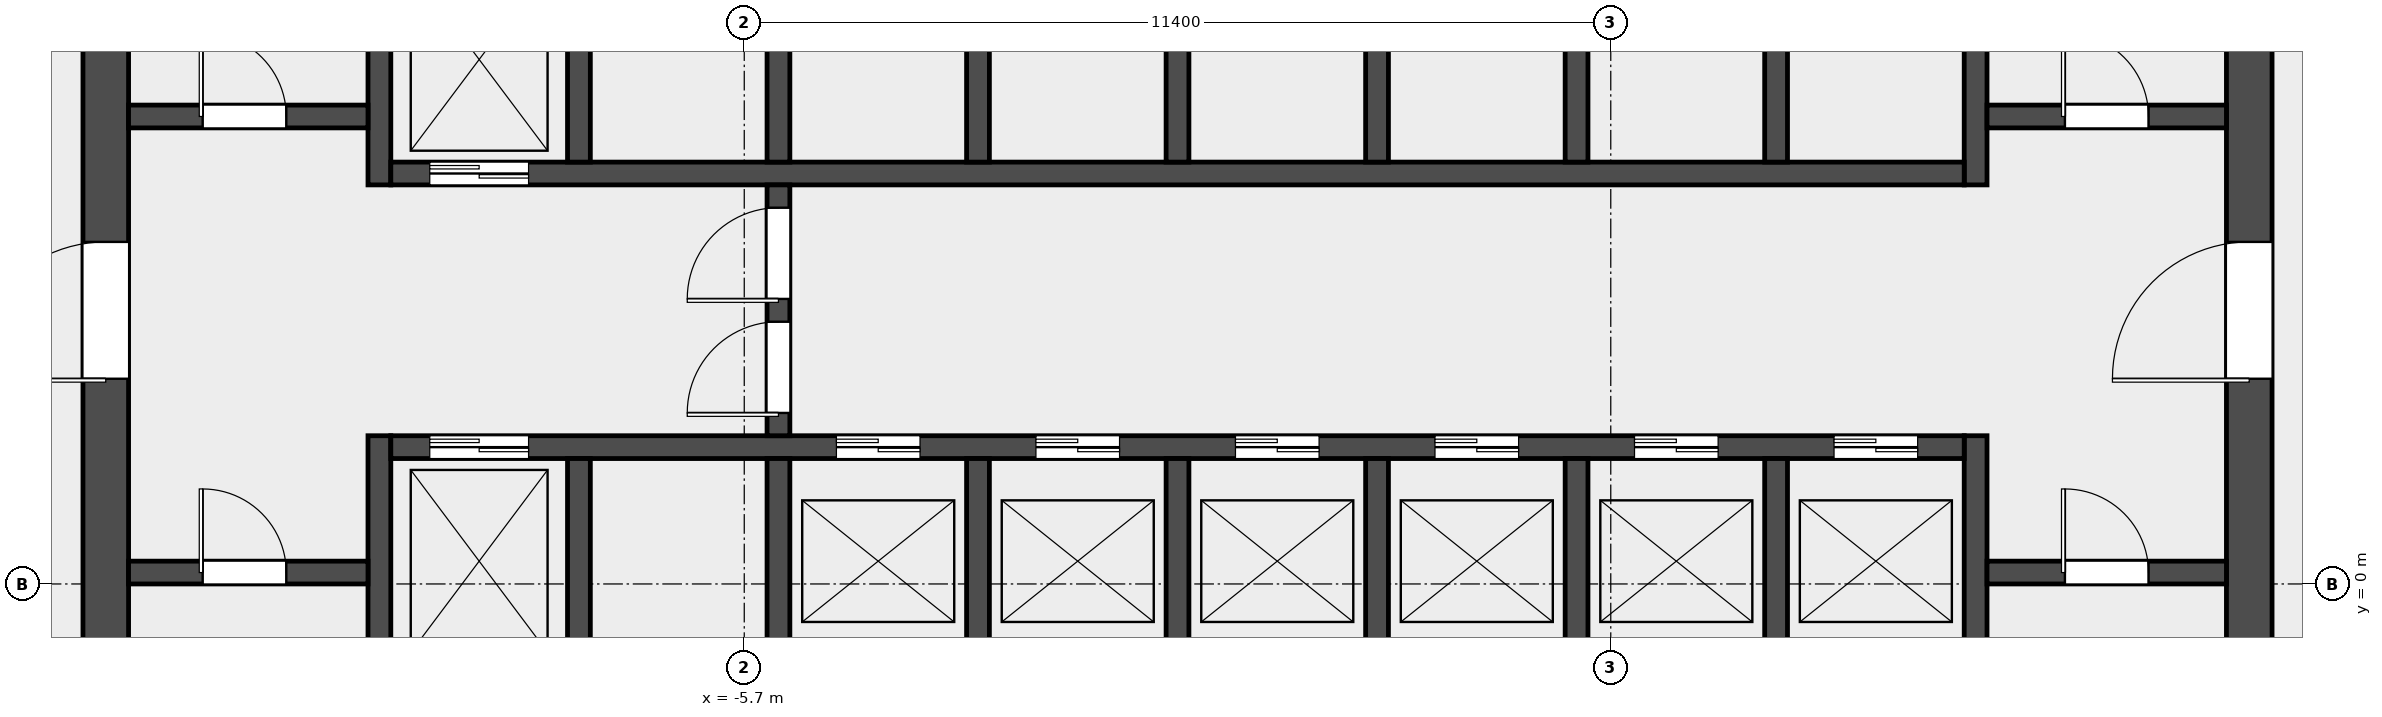
"""IFC4 building model, lengths in metres.
Left out: names, types, materials, properties, quantities, classifications, styles, units other than length and angle.
Written with IfcOpenShell. Run it as: python <this file> out.ifc"""

import sys

from ifc_helpers import new_model, si_unit, direction, frame, frame_2d, origin, place, context, subcontext, project, spatial, rectangle, extrude, element, fill, save


model = new_model("IFC4")
c1 = context("Model", 3, precision=1e-05, world=origin(), true_north=direction((0.0, 1.0)))
c2 = subcontext(c1, "Body", "Model", "MODEL_VIEW")
j1 = project(units=[si_unit("LENGTHUNIT", "METRE"), si_unit("PLANEANGLEUNIT", "RADIAN")], contexts=[c1])
p1 = place(None, origin())
s1 = spatial("IfcSite", under=j1, at=p1, CompositionType="ELEMENT")
p2 = place(p1, origin())
s2 = spatial("IfcBuilding", under=s1, at=p2, CompositionType="ELEMENT")
p3 = place(p2, frame((0.0, 0.0, 103.6)))
s3 = spatial("IfcBuildingStorey", under=s2, at=p3, CompositionType="ELEMENT", Elevation=103.6)
p4 = place(p3, frame((-14.1, -6.6, 0.0), z_axis=(0.0, 0.0, 1.0), x_axis=(0.0, 1.0, 0.0)))
e1 = element("IfcWall", 1, at=p4, inside=s3, PredefinedType="SHEAR", context=c2, shape_type="SweptSolid", body=[
    extrude(rectangle(XDim=19.5, YDim=0.6, at=frame_2d((9.75, 0.0))), origin(), (0.0, 0.0, 1.0), 4.2),
])
p5 = place(p4, frame((9.3, 0.0, 0.0)))
e2 = element("IfcOpeningElement", 2, at=p5, cuts=e1, PredefinedType="OPENING", context=c2, shape_type="SweptSolid", body=[
    extrude(rectangle(XDim=1.8, YDim=2.1, at=frame_2d((0.9, 1.05))), frame((0.0, 0.312, 0.0), z_axis=(0.0, -1.0, 0.0), x_axis=(1.0, 0.0, 0.0)), (0.0, 0.0, 1.0), 0.624),
])
p6 = place(p3, frame((14.1, -6.6, 0.0), z_axis=(0.0, 0.0, 1.0), x_axis=(0.0, 1.0, 0.0)))
e3 = element("IfcWall", 3, at=p6, inside=s3, PredefinedType="SHEAR", context=c2, shape_type="SweptSolid", body=[
    extrude(rectangle(XDim=19.5, YDim=0.6, at=frame_2d((9.75, 0.0))), origin(), (0.0, 0.0, 1.0), 4.2),
])
p7 = place(p6, frame((9.3, 0.0, 0.0)))
e4 = element("IfcOpeningElement", 4, at=p7, cuts=e3, PredefinedType="OPENING", context=c2, shape_type="SweptSolid", body=[
    extrude(rectangle(XDim=1.8, YDim=2.1, at=frame_2d((0.9, 1.05))), frame((0.0, 0.312, 0.0), z_axis=(0.0, -1.0, 0.0), x_axis=(1.0, 0.0, 0.0)), (0.0, 0.0, 1.0), 0.624),
])
p8 = place(p3, frame((-10.5, -6.6, 0.0), z_axis=(0.0, 0.0, 1.0), x_axis=(0.0, 1.0, 0.0)))
e5 = element("IfcWall", 5, at=p8, inside=s3, PredefinedType="SHEAR", context=c2, shape_type="SweptSolid", body=[
    extrude(rectangle(XDim=8.55, YDim=0.3, at=frame_2d((4.275, 0.0))), origin(), (0.0, 0.0, 1.0), 4.2),
])
p9 = place(p3, frame((-10.5, 5.25, 0.0), z_axis=(0.0, 0.0, 1.0), x_axis=(0.0, 1.0, 0.0)))
e6 = element("IfcWall", 6, at=p9, inside=s3, PredefinedType="SHEAR", context=c2, shape_type="SweptSolid", body=[
    extrude(rectangle(XDim=7.65, YDim=0.3, at=frame_2d((3.825, 0.0))), origin(), (0.0, 0.0, 1.0), 4.2),
])
p10 = place(p3, frame((10.5, -6.6, 0.0), z_axis=(0.0, 0.0, 1.0), x_axis=(0.0, 1.0, 0.0)))
e7 = element("IfcWall", 7, at=p10, inside=s3, PredefinedType="SHEAR", context=c2, shape_type="SweptSolid", body=[
    extrude(rectangle(XDim=8.55, YDim=0.3, at=frame_2d((4.275, 0.0))), origin(), (0.0, 0.0, 1.0), 4.2),
])
p11 = place(p3, frame((10.5, 5.25, 0.0), z_axis=(0.0, 0.0, 1.0), x_axis=(0.0, 1.0, 0.0)))
e8 = element("IfcWall", 8, at=p11, inside=s3, PredefinedType="SHEAR", context=c2, shape_type="SweptSolid", body=[
    extrude(rectangle(XDim=7.65, YDim=0.3, at=frame_2d((3.825, 0.0))), origin(), (0.0, 0.0, 1.0), 4.2),
])
p12 = place(p3, frame((-13.8, 0.15, 0.0), z_axis=(0.0, 0.0, 1.0), x_axis=(1.0, 0.0, 0.0)))
e9 = element("IfcWall", 9, at=p12, inside=s3, PredefinedType="SOLIDWALL", context=c2, shape_type="SweptSolid", body=[
    extrude(rectangle(XDim=3.15, YDim=0.3, at=frame_2d((1.575, 0.0))), origin(), (0.0, 0.0, 1.0), 4.2),
])
p13 = place(p12, frame((0.975, 0.0, 0.0)))
e10 = element("IfcOpeningElement", 10, at=p13, cuts=e9, PredefinedType="OPENING", context=c2, shape_type="SweptSolid", body=[
    extrude(rectangle(XDim=1.1, YDim=2.1, at=frame_2d((0.55, 1.05))), frame((0.0, 0.162, 0.0), z_axis=(0.0, -1.0, 0.0), x_axis=(1.0, 0.0, 0.0)), (0.0, 0.0, 1.0), 0.324),
])
p14 = place(p3, frame((-13.8, 6.15, 0.0), z_axis=(0.0, 0.0, 1.0), x_axis=(1.0, 0.0, 0.0)))
e11 = element("IfcWall", 11, at=p14, inside=s3, PredefinedType="SOLIDWALL", context=c2, shape_type="SweptSolid", body=[
    extrude(rectangle(XDim=3.15, YDim=0.3, at=frame_2d((1.575, 0.0))), origin(), (0.0, 0.0, 1.0), 4.2),
])
p15 = place(p14, frame((0.975, 0.0, 0.0)))
e12 = element("IfcOpeningElement", 12, at=p15, cuts=e11, PredefinedType="OPENING", context=c2, shape_type="SweptSolid", body=[
    extrude(rectangle(XDim=1.1, YDim=2.1, at=frame_2d((0.55, 1.05))), frame((0.0, 0.162, 0.0), z_axis=(0.0, -1.0, 0.0), x_axis=(1.0, 0.0, 0.0)), (0.0, 0.0, 1.0), 0.324),
])
p16 = place(p3, frame((10.65, 0.15, 0.0), z_axis=(0.0, 0.0, 1.0), x_axis=(1.0, 0.0, 0.0)))
e13 = element("IfcWall", 13, at=p16, inside=s3, PredefinedType="SOLIDWALL", context=c2, shape_type="SweptSolid", body=[
    extrude(rectangle(XDim=3.15, YDim=0.3, at=frame_2d((1.575, 0.0))), origin(), (0.0, 0.0, 1.0), 4.2),
])
p17 = place(p16, frame((1.025, 0.0, 0.0)))
e14 = element("IfcOpeningElement", 14, at=p17, cuts=e13, PredefinedType="OPENING", context=c2, shape_type="SweptSolid", body=[
    extrude(rectangle(XDim=1.1, YDim=2.1, at=frame_2d((0.55, 1.05))), frame((0.0, 0.162, 0.0), z_axis=(0.0, -1.0, 0.0), x_axis=(1.0, 0.0, 0.0)), (0.0, 0.0, 1.0), 0.324),
])
p18 = place(p3, frame((10.65, 6.15, 0.0), z_axis=(0.0, 0.0, 1.0), x_axis=(1.0, 0.0, 0.0)))
e15 = element("IfcWall", 15, at=p18, inside=s3, PredefinedType="SOLIDWALL", context=c2, shape_type="SweptSolid", body=[
    extrude(rectangle(XDim=3.15, YDim=0.3, at=frame_2d((1.575, 0.0))), origin(), (0.0, 0.0, 1.0), 4.2),
])
p19 = place(p18, frame((1.025, 0.0, 0.0)))
e16 = element("IfcOpeningElement", 16, at=p19, cuts=e15, PredefinedType="OPENING", context=c2, shape_type="SweptSolid", body=[
    extrude(rectangle(XDim=1.1, YDim=2.1, at=frame_2d((0.55, 1.05))), frame((0.0, 0.162, 0.0), z_axis=(0.0, -1.0, 0.0), x_axis=(1.0, 0.0, 0.0)), (0.0, 0.0, 1.0), 0.324),
])
p20 = place(p3, frame((-10.35, 1.8, 0.0), z_axis=(0.0, 0.0, 1.0), x_axis=(1.0, 0.0, 0.0)))
e17 = element("IfcWall", 17, at=p20, inside=s3, PredefinedType="SOLIDWALL", context=c2, shape_type="SweptSolid", body=[
    extrude(rectangle(XDim=20.7, YDim=0.3, at=frame_2d((10.35, 0.0))), origin(), (0.0, 0.0, 1.0), 4.2),
])
p21 = place(p20, frame((0.512, 0.0, 0.0)))
e18 = element("IfcOpeningElement", 18, at=p21, cuts=e17, PredefinedType="OPENING", context=c2, shape_type="SweptSolid", body=[
    extrude(rectangle(XDim=1.3, YDim=2.1, at=frame_2d((0.65, 1.05))), frame((0.0, 0.162, 0.0), z_axis=(0.0, -1.0, 0.0), x_axis=(1.0, 0.0, 0.0)), (0.0, 0.0, 1.0), 0.324),
])
p22 = place(p20, frame((5.863, 0.0, 0.0)))
e19 = element("IfcOpeningElement", 19, at=p22, cuts=e17, PredefinedType="OPENING", context=c2, shape_type="SweptSolid", body=[
    extrude(rectangle(XDim=1.1, YDim=2.1, at=frame_2d((0.55, 1.05))), frame((0.0, 0.162, 0.0), z_axis=(0.0, -1.0, 0.0), x_axis=(1.0, 0.0, 0.0)), (0.0, 0.0, 1.0), 0.324),
])
p23 = place(p20, frame((8.488, 0.0, 0.0)))
e20 = element("IfcOpeningElement", 20, at=p23, cuts=e17, PredefinedType="OPENING", context=c2, shape_type="SweptSolid", body=[
    extrude(rectangle(XDim=1.1, YDim=2.1, at=frame_2d((0.55, 1.05))), frame((0.0, 0.162, 0.0), z_axis=(0.0, -1.0, 0.0), x_axis=(1.0, 0.0, 0.0)), (0.0, 0.0, 1.0), 0.324),
])
p24 = place(p20, frame((11.113, 0.0, 0.0)))
e21 = element("IfcOpeningElement", 21, at=p24, cuts=e17, PredefinedType="OPENING", context=c2, shape_type="SweptSolid", body=[
    extrude(rectangle(XDim=1.1, YDim=2.1, at=frame_2d((0.55, 1.05))), frame((0.0, 0.162, 0.0), z_axis=(0.0, -1.0, 0.0), x_axis=(1.0, 0.0, 0.0)), (0.0, 0.0, 1.0), 0.324),
])
p25 = place(p20, frame((13.738, 0.0, 0.0)))
e22 = element("IfcOpeningElement", 22, at=p25, cuts=e17, PredefinedType="OPENING", context=c2, shape_type="SweptSolid", body=[
    extrude(rectangle(XDim=1.1, YDim=2.1, at=frame_2d((0.55, 1.05))), frame((0.0, 0.162, 0.0), z_axis=(0.0, -1.0, 0.0), x_axis=(1.0, 0.0, 0.0)), (0.0, 0.0, 1.0), 0.324),
])
p26 = place(p20, frame((16.363, 0.0, 0.0)))
e23 = element("IfcOpeningElement", 23, at=p26, cuts=e17, PredefinedType="OPENING", context=c2, shape_type="SweptSolid", body=[
    extrude(rectangle(XDim=1.1, YDim=2.1, at=frame_2d((0.55, 1.05))), frame((0.0, 0.162, 0.0), z_axis=(0.0, -1.0, 0.0), x_axis=(1.0, 0.0, 0.0)), (0.0, 0.0, 1.0), 0.324),
])
p27 = place(p20, frame((18.988, 0.0, 0.0)))
e24 = element("IfcOpeningElement", 24, at=p27, cuts=e17, PredefinedType="OPENING", context=c2, shape_type="SweptSolid", body=[
    extrude(rectangle(XDim=1.1, YDim=2.1, at=frame_2d((0.55, 1.05))), frame((0.0, 0.162, 0.0), z_axis=(0.0, -1.0, 0.0), x_axis=(1.0, 0.0, 0.0)), (0.0, 0.0, 1.0), 0.324),
])
p28 = place(p3, frame((-10.35, 5.4, 0.0), z_axis=(0.0, 0.0, 1.0), x_axis=(1.0, 0.0, 0.0)))
e25 = element("IfcWall", 25, at=p28, inside=s3, PredefinedType="SOLIDWALL", context=c2, shape_type="SweptSolid", body=[
    extrude(rectangle(XDim=20.7, YDim=0.3, at=frame_2d((10.35, 0.0))), origin(), (0.0, 0.0, 1.0), 4.2),
])
p29 = place(p28, frame((0.512, 0.0, 0.0)))
e26 = element("IfcOpeningElement", 26, at=p29, cuts=e25, PredefinedType="OPENING", context=c2, shape_type="SweptSolid", body=[
    extrude(rectangle(XDim=1.3, YDim=2.1, at=frame_2d((0.65, 1.05))), frame((0.0, 0.162, 0.0), z_axis=(0.0, -1.0, 0.0), x_axis=(1.0, 0.0, 0.0)), (0.0, 0.0, 1.0), 0.324),
])
for number, where, z_axis, x_axis in (
    (27, (-7.875, -1.05, 0.0), (0.0, 0.0, 1.0), (0.0, 1.0, 0.0)),
    (28, (-5.25, -1.05, 0.0), (0.0, 0.0, 1.0), (0.0, 1.0, 0.0)),
    (29, (-2.625, -1.05, 0.0), (0.0, 0.0, 1.0), (0.0, 1.0, 0.0)),
    (30, (0.0, -1.05, 0.0), (0.0, 0.0, 1.0), (0.0, 1.0, 0.0)),
    (31, (2.625, -1.05, 0.0), (0.0, 0.0, 1.0), (0.0, 1.0, 0.0)),
    (32, (5.25, -1.05, 0.0), (0.0, 0.0, 1.0), (0.0, 1.0, 0.0)),
    (33, (7.875, -1.05, 0.0), (0.0, 0.0, 1.0), (0.0, 1.0, 0.0)),
    (34, (-7.875, 5.55, 0.0), (0.0, 0.0, 1.0), (0.0, 1.0, 0.0)),
    (35, (-5.25, 5.55, 0.0), (0.0, 0.0, 1.0), (0.0, 1.0, 0.0)),
    (36, (-2.625, 5.55, 0.0), (0.0, 0.0, 1.0), (0.0, 1.0, 0.0)),
    (37, (0.0, 5.55, 0.0), (0.0, 0.0, 1.0), (0.0, 1.0, 0.0)),
    (38, (2.625, 5.55, 0.0), (0.0, 0.0, 1.0), (0.0, 1.0, 0.0)),
    (39, (5.25, 5.55, 0.0), (0.0, 0.0, 1.0), (0.0, 1.0, 0.0)),
    (40, (7.875, 5.55, 0.0), (0.0, 0.0, 1.0), (0.0, 1.0, 0.0)),
):
    element("IfcWall", number, at=place(p3, frame(where, z_axis=z_axis, x_axis=x_axis)), inside=s3, PredefinedType="SOLIDWALL", context=c2, shape_type="SweptSolid", body=[
        extrude(rectangle(XDim=2.7, YDim=0.3, at=frame_2d((1.35, 0.0))), origin(), (0.0, 0.0, 1.0), 4.2),
    ])
p30 = place(p3, frame((-5.25, 1.95, 0.0), z_axis=(0.0, 0.0, 1.0), x_axis=(0.0, 1.0, 0.0)))
e41 = element("IfcWall", 41, at=p30, inside=s3, PredefinedType="SOLIDWALL", context=c2, shape_type="SweptSolid", body=[
    extrude(rectangle(XDim=3.3, YDim=0.3, at=frame_2d((1.65, 0.0))), origin(), (0.0, 0.0, 1.0), 4.2),
])
p31 = place(p30, frame((0.3, 0.0, 0.0)))
e42 = element("IfcOpeningElement", 42, at=p31, cuts=e41, PredefinedType="OPENING", context=c2, shape_type="SweptSolid", body=[
    extrude(rectangle(XDim=1.2, YDim=2.1, at=frame_2d((0.6, 1.05))), frame((0.0, 0.162, 0.0), z_axis=(0.0, -1.0, 0.0), x_axis=(1.0, 0.0, 0.0)), (0.0, 0.0, 1.0), 0.324),
])
p32 = place(p30, frame((1.8, 0.0, 0.0)))
e43 = element("IfcOpeningElement", 43, at=p32, cuts=e41, PredefinedType="OPENING", context=c2, shape_type="SweptSolid", body=[
    extrude(rectangle(XDim=1.2, YDim=2.1, at=frame_2d((0.6, 1.05))), frame((0.0, 0.162, 0.0), z_axis=(0.0, -1.0, 0.0), x_axis=(1.0, 0.0, 0.0)), (0.0, 0.0, 1.0), 0.324),
])
p33 = place(p13, origin())
e44 = element("IfcDoor", 44, at=p33, inside=s3, OperationType="SINGLE_SWING_LEFT", PredefinedType="DOOR", context=c2, shape_type="SweptSolid", body=[
    extrude(rectangle(XDim=1.1, YDim=2.1, at=frame_2d((0.55, 1.05))), frame((0.0, 0.025, 0.0), z_axis=(0.0, -1.0, 0.0), x_axis=(1.0, 0.0, 0.0)), (0.0, 0.0, 1.0), 0.05),
])
fill(e10, e44)
p34 = place(p15, origin())
e45 = element("IfcDoor", 45, at=p34, inside=s3, OperationType="SINGLE_SWING_LEFT", PredefinedType="DOOR", context=c2, shape_type="SweptSolid", body=[
    extrude(rectangle(XDim=1.1, YDim=2.1, at=frame_2d((0.55, 1.05))), frame((0.0, 0.025, 0.0), z_axis=(0.0, -1.0, 0.0), x_axis=(1.0, 0.0, 0.0)), (0.0, 0.0, 1.0), 0.05),
])
fill(e12, e45)
p35 = place(p17, origin())
e46 = element("IfcDoor", 46, at=p35, inside=s3, OperationType="SINGLE_SWING_RIGHT", PredefinedType="DOOR", context=c2, shape_type="SweptSolid", body=[
    extrude(rectangle(XDim=1.1, YDim=2.1, at=frame_2d((0.55, 1.05))), frame((0.0, 0.025, 0.0), z_axis=(0.0, -1.0, 0.0), x_axis=(1.0, 0.0, 0.0)), (0.0, 0.0, 1.0), 0.05),
])
fill(e14, e46)
p36 = place(p19, origin())
e47 = element("IfcDoor", 47, at=p36, inside=s3, OperationType="SINGLE_SWING_RIGHT", PredefinedType="DOOR", context=c2, shape_type="SweptSolid", body=[
    extrude(rectangle(XDim=1.1, YDim=2.1, at=frame_2d((0.55, 1.05))), frame((0.0, 0.025, 0.0), z_axis=(0.0, -1.0, 0.0), x_axis=(1.0, 0.0, 0.0)), (0.0, 0.0, 1.0), 0.05),
])
fill(e16, e47)
p37 = place(p5, origin())
e48 = element("IfcDoor", 48, at=p37, inside=s3, OperationType="DOUBLE_DOOR_SINGLE_SWING", PredefinedType="DOOR", context=c2, shape_type="SweptSolid", body=[
    extrude(rectangle(XDim=1.8, YDim=2.1, at=frame_2d((0.9, 1.05))), frame((0.0, 0.025, 0.0), z_axis=(0.0, -1.0, 0.0), x_axis=(1.0, 0.0, 0.0)), (0.0, 0.0, 1.0), 0.05),
])
fill(e2, e48)
p38 = place(p7, origin())
e49 = element("IfcDoor", 49, at=p38, inside=s3, OperationType="DOUBLE_DOOR_SINGLE_SWING", PredefinedType="DOOR", context=c2, shape_type="SweptSolid", body=[
    extrude(rectangle(XDim=1.8, YDim=2.1, at=frame_2d((0.9, 1.05))), frame((0.0, 0.025, 0.0), z_axis=(0.0, -1.0, 0.0), x_axis=(1.0, 0.0, 0.0)), (0.0, 0.0, 1.0), 0.05),
])
fill(e4, e49)
p39 = place(p31, origin())
e50 = element("IfcDoor", 50, at=p39, inside=s3, OperationType="SINGLE_SWING_LEFT", PredefinedType="DOOR", context=c2, shape_type="SweptSolid", body=[
    extrude(rectangle(XDim=1.2, YDim=2.1, at=frame_2d((0.6, 1.05))), frame((0.0, 0.025, 0.0), z_axis=(0.0, -1.0, 0.0), x_axis=(1.0, 0.0, 0.0)), (0.0, 0.0, 1.0), 0.05),
])
fill(e42, e50)
p40 = place(p32, origin())
e51 = element("IfcDoor", 51, at=p40, inside=s3, OperationType="SINGLE_SWING_RIGHT", PredefinedType="DOOR", context=c2, shape_type="SweptSolid", body=[
    extrude(rectangle(XDim=1.2, YDim=2.1, at=frame_2d((0.6, 1.05))), frame((0.0, 0.025, 0.0), z_axis=(0.0, -1.0, 0.0), x_axis=(1.0, 0.0, 0.0)), (0.0, 0.0, 1.0), 0.05),
])
fill(e43, e51)
p41 = place(p21, origin())
e52 = element("IfcDoor", 52, at=p41, inside=s3, OperationType="DOUBLE_DOOR_SLIDING", PredefinedType="DOOR", context=c2, shape_type="SweptSolid", body=[
    extrude(rectangle(XDim=1.3, YDim=2.1, at=frame_2d((0.65, 1.05))), frame((0.0, 0.025, 0.0), z_axis=(0.0, -1.0, 0.0), x_axis=(1.0, 0.0, 0.0)), (0.0, 0.0, 1.0), 0.05),
])
fill(e18, e52)
p42 = place(p22, origin())
e53 = element("IfcDoor", 53, at=p42, inside=s3, OperationType="DOUBLE_DOOR_SLIDING", PredefinedType="DOOR", context=c2, shape_type="SweptSolid", body=[
    extrude(rectangle(XDim=1.1, YDim=2.1, at=frame_2d((0.55, 1.05))), frame((0.0, 0.025, 0.0), z_axis=(0.0, -1.0, 0.0), x_axis=(1.0, 0.0, 0.0)), (0.0, 0.0, 1.0), 0.05),
])
fill(e19, e53)
p43 = place(p23, origin())
e54 = element("IfcDoor", 54, at=p43, inside=s3, OperationType="DOUBLE_DOOR_SLIDING", PredefinedType="DOOR", context=c2, shape_type="SweptSolid", body=[
    extrude(rectangle(XDim=1.1, YDim=2.1, at=frame_2d((0.55, 1.05))), frame((0.0, 0.025, 0.0), z_axis=(0.0, -1.0, 0.0), x_axis=(1.0, 0.0, 0.0)), (0.0, 0.0, 1.0), 0.05),
])
fill(e20, e54)
p44 = place(p24, origin())
e55 = element("IfcDoor", 55, at=p44, inside=s3, OperationType="DOUBLE_DOOR_SLIDING", PredefinedType="DOOR", context=c2, shape_type="SweptSolid", body=[
    extrude(rectangle(XDim=1.1, YDim=2.1, at=frame_2d((0.55, 1.05))), frame((0.0, 0.025, 0.0), z_axis=(0.0, -1.0, 0.0), x_axis=(1.0, 0.0, 0.0)), (0.0, 0.0, 1.0), 0.05),
])
fill(e21, e55)
p45 = place(p25, origin())
e56 = element("IfcDoor", 56, at=p45, inside=s3, OperationType="DOUBLE_DOOR_SLIDING", PredefinedType="DOOR", context=c2, shape_type="SweptSolid", body=[
    extrude(rectangle(XDim=1.1, YDim=2.1, at=frame_2d((0.55, 1.05))), frame((0.0, 0.025, 0.0), z_axis=(0.0, -1.0, 0.0), x_axis=(1.0, 0.0, 0.0)), (0.0, 0.0, 1.0), 0.05),
])
fill(e22, e56)
p46 = place(p26, origin())
e57 = element("IfcDoor", 57, at=p46, inside=s3, OperationType="DOUBLE_DOOR_SLIDING", PredefinedType="DOOR", context=c2, shape_type="SweptSolid", body=[
    extrude(rectangle(XDim=1.1, YDim=2.1, at=frame_2d((0.55, 1.05))), frame((0.0, 0.025, 0.0), z_axis=(0.0, -1.0, 0.0), x_axis=(1.0, 0.0, 0.0)), (0.0, 0.0, 1.0), 0.05),
])
fill(e23, e57)
p47 = place(p27, origin())
e58 = element("IfcDoor", 58, at=p47, inside=s3, OperationType="DOUBLE_DOOR_SLIDING", PredefinedType="DOOR", context=c2, shape_type="SweptSolid", body=[
    extrude(rectangle(XDim=1.1, YDim=2.1, at=frame_2d((0.55, 1.05))), frame((0.0, 0.025, 0.0), z_axis=(0.0, -1.0, 0.0), x_axis=(1.0, 0.0, 0.0)), (0.0, 0.0, 1.0), 0.05),
])
fill(e24, e58)
p48 = place(p29, origin())
e59 = element("IfcDoor", 59, at=p48, inside=s3, OperationType="DOUBLE_DOOR_SLIDING", PredefinedType="DOOR", context=c2, shape_type="SweptSolid", body=[
    extrude(rectangle(XDim=1.3, YDim=2.1, at=frame_2d((0.65, 1.05))), frame((0.0, 0.025, 0.0), z_axis=(0.0, -1.0, 0.0), x_axis=(1.0, 0.0, 0.0)), (0.0, 0.0, 1.0), 0.05),
])
fill(e26, e59)
save(model, sys.argv[1])
